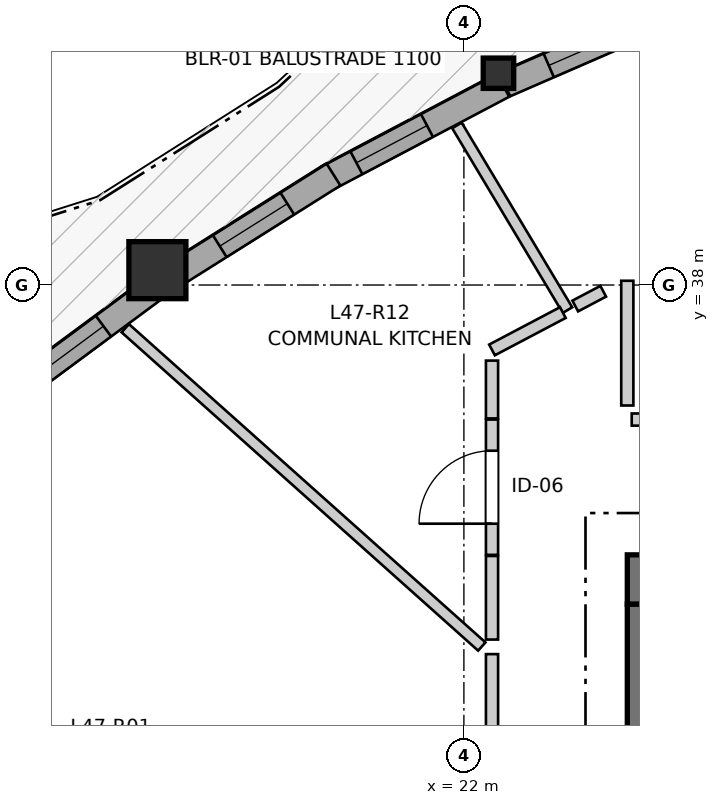
"""IFC4 building model, lengths in metres.
Left out: names, types, materials, properties, quantities, classifications, styles, units other than length and angle.
Written with IfcOpenShell. Run it as: python <this file> out.ifc"""

import sys

from ifc_helpers import new_model, si_unit, direction, frame, frame_2d, origin, origin_2d, place, context, subcontext, project, spatial, rectangle, i_section, extrude, source, transform, mapped, element, fill, save


model = new_model("IFC4")
c1 = context("Model", 3, precision=1e-05, world=origin(), true_north=direction((0.0, 1.0)))
c2 = subcontext(c1, "Body", "Model", "MODEL_VIEW")
j1 = project(units=[si_unit("LENGTHUNIT", "METRE"), si_unit("PLANEANGLEUNIT", "RADIAN")], contexts=[c1])
p1 = place(None, origin())
s1 = spatial("IfcSite", under=j1, at=p1, CompositionType="ELEMENT")
p2 = place(p1, origin())
s2 = spatial("IfcBuilding", under=s1, at=p2, CompositionType="ELEMENT")
p3 = place(p2, frame((0.0, 0.0, 158.6)))
s3 = spatial("IfcBuildingStorey", under=s2, at=p3, CompositionType="ELEMENT", Elevation=158.6)
p4 = place(p3, frame((36.55, 34.125, 0.0), z_axis=(0.0, 0.0, 1.0), x_axis=(-1.0, 0.0, 0.0)))
e1 = element("IfcWall", 1, at=p4, inside=s3, PredefinedType="SHEAR", context=c2, shape_type="SweptSolid", body=[
    extrude(rectangle(XDim=12.4, YDim=0.65, at=frame_2d((6.2, 0.0))), origin(), (0.0, 0.0, 1.0), 2.95),
])
p5 = place(p3, frame((24.475, 33.8, 0.0), z_axis=(0.0, 0.0, 1.0), x_axis=(0.0, -1.0, 0.0)))
e2 = element("IfcWall", 2, at=p5, inside=s3, PredefinedType="SHEAR", context=c2, shape_type="SweptSolid", body=[
    extrude(rectangle(XDim=15.6, YDim=0.65, at=frame_2d((7.8, 0.0))), origin(), (0.0, 0.0, 1.0), 2.95),
])
p6 = place(p5, frame((7.05, 0.0, 0.0)))
e3 = element("IfcOpeningElement", 3, at=p6, cuts=e2, PredefinedType="OPENING", context=c2, shape_type="SweptSolid", body=[
    extrude(rectangle(XDim=1.5, YDim=2.15, at=frame_2d((0.75, 1.075))), frame((0.0, 0.335, 0.0), z_axis=(0.0, -1.0, 0.0), x_axis=(1.0, 0.0, 0.0)), (0.0, 0.0, 1.0), 0.67),
])
p7 = place(p5, frame((3.52, 0.0, 0.0)))
e4 = element("IfcOpeningElement", 4, at=p7, cuts=e2, PredefinedType="OPENING", context=c2, shape_type="SweptSolid", body=[
    extrude(rectangle(XDim=0.86, YDim=2.05, at=frame_2d((0.43, 1.025))), frame((0.0, 0.335, 0.0), z_axis=(0.0, -1.0, 0.0), x_axis=(1.0, 0.0, 0.0)), (0.0, 0.0, 1.0), 0.67),
])
p8 = place(p5, frame((11.22, 0.0, 0.0)))
e5 = element("IfcOpeningElement", 5, at=p8, cuts=e2, PredefinedType="OPENING", context=c2, shape_type="SweptSolid", body=[
    extrude(rectangle(XDim=0.86, YDim=2.05, at=frame_2d((0.43, 1.025))), frame((0.0, 0.335, 0.0), z_axis=(0.0, -1.0, 0.0), x_axis=(1.0, 0.0, 0.0)), (0.0, 0.0, 1.0), 0.67),
])
m1 = source(origin(), c2, "Body", "SweptSolid", [
    extrude(i_section(OverallWidth=0.401, OverallDepth=0.399, WebThickness=0.023, FlangeThickness=0.036, FilletRadius=0.015, at=origin_2d()), origin(), (0.0, 0.0, 1.0), 2.95),
])
p9 = place(p3, frame((22.455, 40.786, 0.0), z_axis=(0.0, 0.0, 1.0), x_axis=(1.0, 0.0, 0.0)))
e6 = element("IfcColumn", 6, at=p9, inside=s3, PredefinedType="PILASTER", context=c2, shape_type="MappedRepresentation", body=[
    mapped(m1, transform((0.0, 0.0, 0.0), x_axis=(1.0, 0.0, 0.0), y_axis=(0.0, 1.0, 0.0), z_axis=(0.0, 0.0, 1.0), scale=1.0)),
])
m2 = source(origin(), c2, "Body", "SweptSolid", [
    extrude(rectangle(XDim=0.75, YDim=0.75, at=origin_2d()), origin(), (0.0, 0.0, 1.0), 2.95),
])
p10 = place(p3, frame((17.967, 38.195, 0.0), z_axis=(0.0, 0.0, 1.0), x_axis=(1.0, 0.0, 0.0)))
e7 = element("IfcColumn", 7, at=p10, inside=s3, PredefinedType="COLUMN", context=c2, shape_type="MappedRepresentation", body=[
    mapped(m2, transform((0.0, 0.0, 0.0), x_axis=(1.0, 0.0, 0.0), y_axis=(0.0, 1.0, 0.0), z_axis=(0.0, 0.0, 1.0), scale=1.0)),
])
p11 = place(p3, frame((24.949, 41.685, 0.0), z_axis=(0.0, 0.0, 1.0), x_axis=(-0.917112921707, -0.398627506373, 0.0)))
e8 = element("IfcWall", 8, at=p11, inside=s3, PredefinedType="SOLIDWALL", context=c2, shape_type="SweptSolid", body=[
    extrude(rectangle(XDim=2.625, YDim=0.34, at=frame_2d((1.313, 0.0))), origin(), (0.0, 0.0, 1.0), 2.53),
])
p12 = place(p11, frame((0.648, 0.0, 0.82)))
e9 = element("IfcOpeningElement", 9, at=p12, cuts=e8, PredefinedType="OPENING", context=c2, shape_type="SweptSolid", body=[
    extrude(rectangle(XDim=1.35, YDim=1.45, at=frame_2d((0.675, 0.725))), frame((0.0, 0.18, 0.0), z_axis=(0.0, -1.0, 0.0), x_axis=(1.0, 0.0, 0.0)), (0.0, 0.0, 1.0), 0.36),
])
p13 = place(p3, frame((22.517, 40.627, 0.0), z_axis=(0.0, 0.0, 1.0), x_axis=(-0.884374030812, -0.466778934427, 0.0)))
e10 = element("IfcWall", 10, at=p13, inside=s3, PredefinedType="SOLIDWALL", context=c2, shape_type="SweptSolid", body=[
    extrude(rectangle(XDim=2.611, YDim=0.34, at=frame_2d((1.306, 0.0))), origin(), (0.0, 0.0, 1.0), 2.53),
])
p14 = place(p13, frame((1.133, 0.0, 0.82)))
e11 = element("IfcOpeningElement", 11, at=p14, cuts=e10, PredefinedType="OPENING", context=c2, shape_type="SweptSolid", body=[
    extrude(rectangle(XDim=1.05, YDim=1.45, at=frame_2d((0.525, 0.725))), frame((0.0, 0.18, 0.0), z_axis=(0.0, -1.0, 0.0), x_axis=(1.0, 0.0, 0.0)), (0.0, 0.0, 1.0), 0.36),
])
p15 = place(p3, frame((20.284, 39.452, 0.0), z_axis=(0.0, 0.0, 1.0), x_axis=(-0.846415587119, -0.532522913951, 0.0)))
e12 = element("IfcWall", 12, at=p15, inside=s3, PredefinedType="SOLIDWALL", context=c2, shape_type="SweptSolid", body=[
    extrude(rectangle(XDim=2.476, YDim=0.34, at=frame_2d((1.238, 0.0))), origin(), (0.0, 0.0, 1.0), 2.53),
])
p16 = place(p15, frame((0.718, 0.0, 0.82)))
e13 = element("IfcOpeningElement", 13, at=p16, cuts=e12, PredefinedType="OPENING", context=c2, shape_type="SweptSolid", body=[
    extrude(rectangle(XDim=1.05, YDim=1.45, at=frame_2d((0.525, 0.725))), frame((0.0, 0.18, 0.0), z_axis=(0.0, -1.0, 0.0), x_axis=(1.0, 0.0, 0.0)), (0.0, 0.0, 1.0), 0.36),
])
p17 = place(p3, frame((17.944, 37.967, 0.0), z_axis=(0.0, 0.0, 1.0), x_axis=(-0.803795025682, -0.594906342788, 0.0)))
e14 = element("IfcWall", 14, at=p17, inside=s3, PredefinedType="SOLIDWALL", context=c2, shape_type="SweptSolid", body=[
    extrude(rectangle(XDim=2.491, YDim=0.34, at=frame_2d((1.245, 0.0))), origin(), (0.0, 0.0, 1.0), 2.53),
])
p18 = place(p17, frame((0.853, 0.0, 0.82)))
e15 = element("IfcOpeningElement", 15, at=p18, cuts=e14, PredefinedType="OPENING", context=c2, shape_type="SweptSolid", body=[
    extrude(rectangle(XDim=1.35, YDim=1.45, at=frame_2d((0.675, 0.725))), frame((0.0, 0.18, 0.0), z_axis=(0.0, -1.0, 0.0), x_axis=(1.0, 0.0, 0.0)), (0.0, 0.0, 1.0), 0.36),
])
p19 = place(p3, frame((24.208, 36.23, 0.0), z_axis=(0.0, 0.0, 1.0), x_axis=(1.0, 0.0, 0.0)))
e16 = element("IfcWall", 16, at=p19, inside=s3, PredefinedType="PARTITIONING", context=c2, shape_type="SweptSolid", body=[
    extrude(rectangle(XDim=5.832, YDim=0.16, at=frame_2d((2.916, 0.0))), origin(), (0.0, 0.0, 1.0), 2.95),
])
p20 = place(p19, frame((2.438, 0.0, 0.0)))
e17 = element("IfcOpeningElement", 17, at=p20, cuts=e16, PredefinedType="OPENING", context=c2, shape_type="SweptSolid", body=[
    extrude(rectangle(XDim=0.96, YDim=2.1, at=frame_2d((0.48, 1.05))), frame((0.0, 0.09, 0.0), z_axis=(0.0, -1.0, 0.0), x_axis=(1.0, 0.0, 0.0)), (0.0, 0.0, 1.0), 0.18),
])
p21 = place(p3, frame((22.37, 27.85, 0.0), z_axis=(0.0, 0.0, 1.0), x_axis=(0.0, 1.0, 0.0)))
e18 = element("IfcWall", 18, at=p21, inside=s3, PredefinedType="PARTITIONING", context=c2, shape_type="SweptSolid", body=[
    extrude(rectangle(XDim=5.294, YDim=0.16, at=frame_2d((2.647, 0.0))), origin(), (0.0, 0.0, 1.0), 2.95),
])
p22 = place(p21, frame((2.341, 0.0, 0.0)))
e19 = element("IfcOpeningElement", 19, at=p22, cuts=e18, PredefinedType="OPENING", context=c2, shape_type="SweptSolid", body=[
    extrude(rectangle(XDim=1.3, YDim=2.1, at=frame_2d((0.65, 1.05))), frame((0.0, 0.09, 0.0), z_axis=(0.0, -1.0, 0.0), x_axis=(1.0, 0.0, 0.0)), (0.0, 0.0, 1.0), 0.18),
])
p23 = place(p3, frame((22.37, 34.45, 0.0), z_axis=(0.0, 0.0, 1.0), x_axis=(0.0, 1.0, 0.0)))
e20 = element("IfcWall", 20, at=p23, inside=s3, PredefinedType="PARTITIONING", context=c2, shape_type="SweptSolid", body=[
    extrude(rectangle(XDim=1.78, YDim=0.16, at=frame_2d((0.89, 0.0))), origin(), (0.0, 0.0, 1.0), 2.95),
])
p24 = place(p23, frame((0.41, 0.0, 0.0)))
e21 = element("IfcOpeningElement", 21, at=p24, cuts=e20, PredefinedType="OPENING", context=c2, shape_type="SweptSolid", body=[
    extrude(rectangle(XDim=0.96, YDim=2.1, at=frame_2d((0.48, 1.05))), frame((0.0, 0.09, 0.0), z_axis=(0.0, -1.0, 0.0), x_axis=(1.0, 0.0, 0.0)), (0.0, 0.0, 1.0), 0.18),
])
p25 = place(p3, frame((17.545, 37.432, 0.0), z_axis=(0.0, 0.0, 1.0), x_axis=(0.745965905636, -0.665984134668, 0.0)))
e22 = element("IfcWall", 22, at=p25, inside=s3, PredefinedType="PARTITIONING", context=c2, shape_type="SweptSolid", body=[
    extrude(rectangle(XDim=6.288, YDim=0.145, at=frame_2d((3.144, 0.0))), origin(), (0.0, 0.0, 1.0), 2.95),
])
p26 = place(p3, frame((21.908, 40.1, 0.0), z_axis=(0.0, 0.0, 1.0), x_axis=(0.513582752497, -0.85804006686, 0.0)))
e23 = element("IfcWall", 23, at=p26, inside=s3, PredefinedType="PARTITIONING", context=c2, shape_type="SweptSolid", body=[
    extrude(rectangle(XDim=2.832, YDim=0.145, at=frame_2d((1.416, 0.0))), origin(), (0.0, 0.0, 1.0), 2.95),
])
p27 = place(p3, frame((24.15, 36.415, 0.0), z_axis=(0.0, 0.0, 1.0), x_axis=(0.0, 1.0, 0.0)))
e24 = element("IfcWall", 24, at=p27, inside=s3, PredefinedType="PARTITIONING", context=c2, shape_type="SweptSolid", body=[
    extrude(rectangle(XDim=1.641, YDim=0.16, at=frame_2d((0.82, 0.0))), origin(), (0.0, 0.0, 1.0), 2.95),
])
p28 = place(p3, frame((22.37, 33.336, 0.0), z_axis=(0.0, 0.0, 1.0), x_axis=(0.0, 1.0, 0.0)))
e25 = element("IfcWall", 25, at=p28, inside=s3, PredefinedType="PARTITIONING", context=c2, shape_type="SweptSolid", body=[
    extrude(rectangle(XDim=1.099, YDim=0.16, at=frame_2d((0.55, 0.0))), origin(), (0.0, 0.0, 1.0), 2.95),
])
p29 = place(p3, frame((22.37, 37.146, 0.0), z_axis=(0.0, 0.0, 1.0), x_axis=(0.884530854714, 0.46648168995, 0.0)))
e26 = element("IfcWall", 26, at=p29, inside=s3, PredefinedType="PARTITIONING", context=c2, shape_type="SweptSolid", body=[
    extrude(rectangle(XDim=1.053, YDim=0.16, at=frame_2d((0.527, 0.0))), origin(), (0.0, 0.0, 1.0), 2.558),
])
p30 = place(p3, frame((22.37, 36.245, 0.0), z_axis=(0.0, 0.0, 1.0), x_axis=(0.0, 1.0, 0.0)))
e27 = element("IfcWall", 27, at=p30, inside=s3, PredefinedType="PARTITIONING", context=c2, shape_type="SweptSolid", body=[
    extrude(rectangle(XDim=0.76, YDim=0.16, at=frame_2d((0.38, 0.0))), origin(), (0.0, 0.0, 1.0), 2.95),
])
p31 = place(p3, frame((23.465, 37.724, 0.0), z_axis=(0.0, 0.0, 1.0), x_axis=(0.884344349775, 0.466835164722, 0.0)))
e28 = element("IfcWall", 28, at=p31, inside=s3, PredefinedType="PARTITIONING", context=c2, shape_type="SweptSolid", body=[
    extrude(rectangle(XDim=0.416, YDim=0.16, at=frame_2d((0.208, 0.0))), origin(), (0.0, 0.0, 1.0), 2.558),
])
m3 = source(origin(), c2, "Body", "SweptSolid", [
    extrude(rectangle(XDim=1.35, YDim=1.45, at=frame_2d((0.675, 0.725))), frame((0.0, 0.03, 0.0), z_axis=(0.0, -1.0, 0.0), x_axis=(1.0, 0.0, 0.0)), (0.0, 0.0, 1.0), 0.06),
])
p32 = place(p12, origin())
e29 = element("IfcWindow", 29, at=p32, inside=s3, PartitioningType="SINGLE_PANEL", PredefinedType="WINDOW", context=c2, shape_type="MappedRepresentation", body=[
    mapped(m3, transform((0.0, 0.0, 0.0), x_axis=(1.0, 0.0, 0.0), y_axis=(0.0, 1.0, 0.0), z_axis=(0.0, 0.0, 1.0), scale=1.0)),
])
fill(e9, e29)
m4 = source(origin(), c2, "Body", "SweptSolid", [
    extrude(rectangle(XDim=1.05, YDim=1.45, at=frame_2d((0.525, 0.725))), frame((0.0, 0.03, 0.0), z_axis=(0.0, -1.0, 0.0), x_axis=(1.0, 0.0, 0.0)), (0.0, 0.0, 1.0), 0.06),
])
p33 = place(p14, origin())
e30 = element("IfcWindow", 30, at=p33, inside=s3, PartitioningType="SINGLE_PANEL", PredefinedType="WINDOW", context=c2, shape_type="MappedRepresentation", body=[
    mapped(m4, transform((0.0, 0.0, 0.0), x_axis=(1.0, 0.0, 0.0), y_axis=(0.0, 1.0, 0.0), z_axis=(0.0, 0.0, 1.0), scale=1.0)),
])
fill(e11, e30)
p34 = place(p16, origin())
e31 = element("IfcWindow", 31, at=p34, inside=s3, PartitioningType="SINGLE_PANEL", PredefinedType="WINDOW", context=c2, shape_type="MappedRepresentation", body=[
    mapped(m4, transform((0.0, 0.0, 0.0), x_axis=(1.0, 0.0, 0.0), y_axis=(0.0, 1.0, 0.0), z_axis=(0.0, 0.0, 1.0), scale=1.0)),
])
fill(e13, e31)
p35 = place(p18, origin())
e32 = element("IfcWindow", 32, at=p35, inside=s3, PartitioningType="SINGLE_PANEL", PredefinedType="WINDOW", context=c2, shape_type="MappedRepresentation", body=[
    mapped(m3, transform((0.0, 0.0, 0.0), x_axis=(1.0, 0.0, 0.0), y_axis=(0.0, 1.0, 0.0), z_axis=(0.0, 0.0, 1.0), scale=1.0)),
])
fill(e15, e32)
m5 = source(origin(), c2, "Body", "SweptSolid", [
    extrude(rectangle(XDim=0.96, YDim=2.1, at=frame_2d((0.48, 1.05))), frame((0.0, 0.025, 0.0), z_axis=(0.0, -1.0, 0.0), x_axis=(1.0, 0.0, 0.0)), (0.0, 0.0, 1.0), 0.05),
])
p36 = place(p24, origin())
e33 = element("IfcDoor", 33, at=p36, inside=s3, OperationType="SINGLE_SWING_LEFT", PredefinedType="DOOR", context=c2, shape_type="MappedRepresentation", body=[
    mapped(m5, transform((0.0, 0.0, 0.0), x_axis=(1.0, 0.0, 0.0), y_axis=(0.0, 1.0, 0.0), z_axis=(0.0, 0.0, 1.0), scale=1.0)),
])
fill(e21, e33)
save(model, sys.argv[1])
